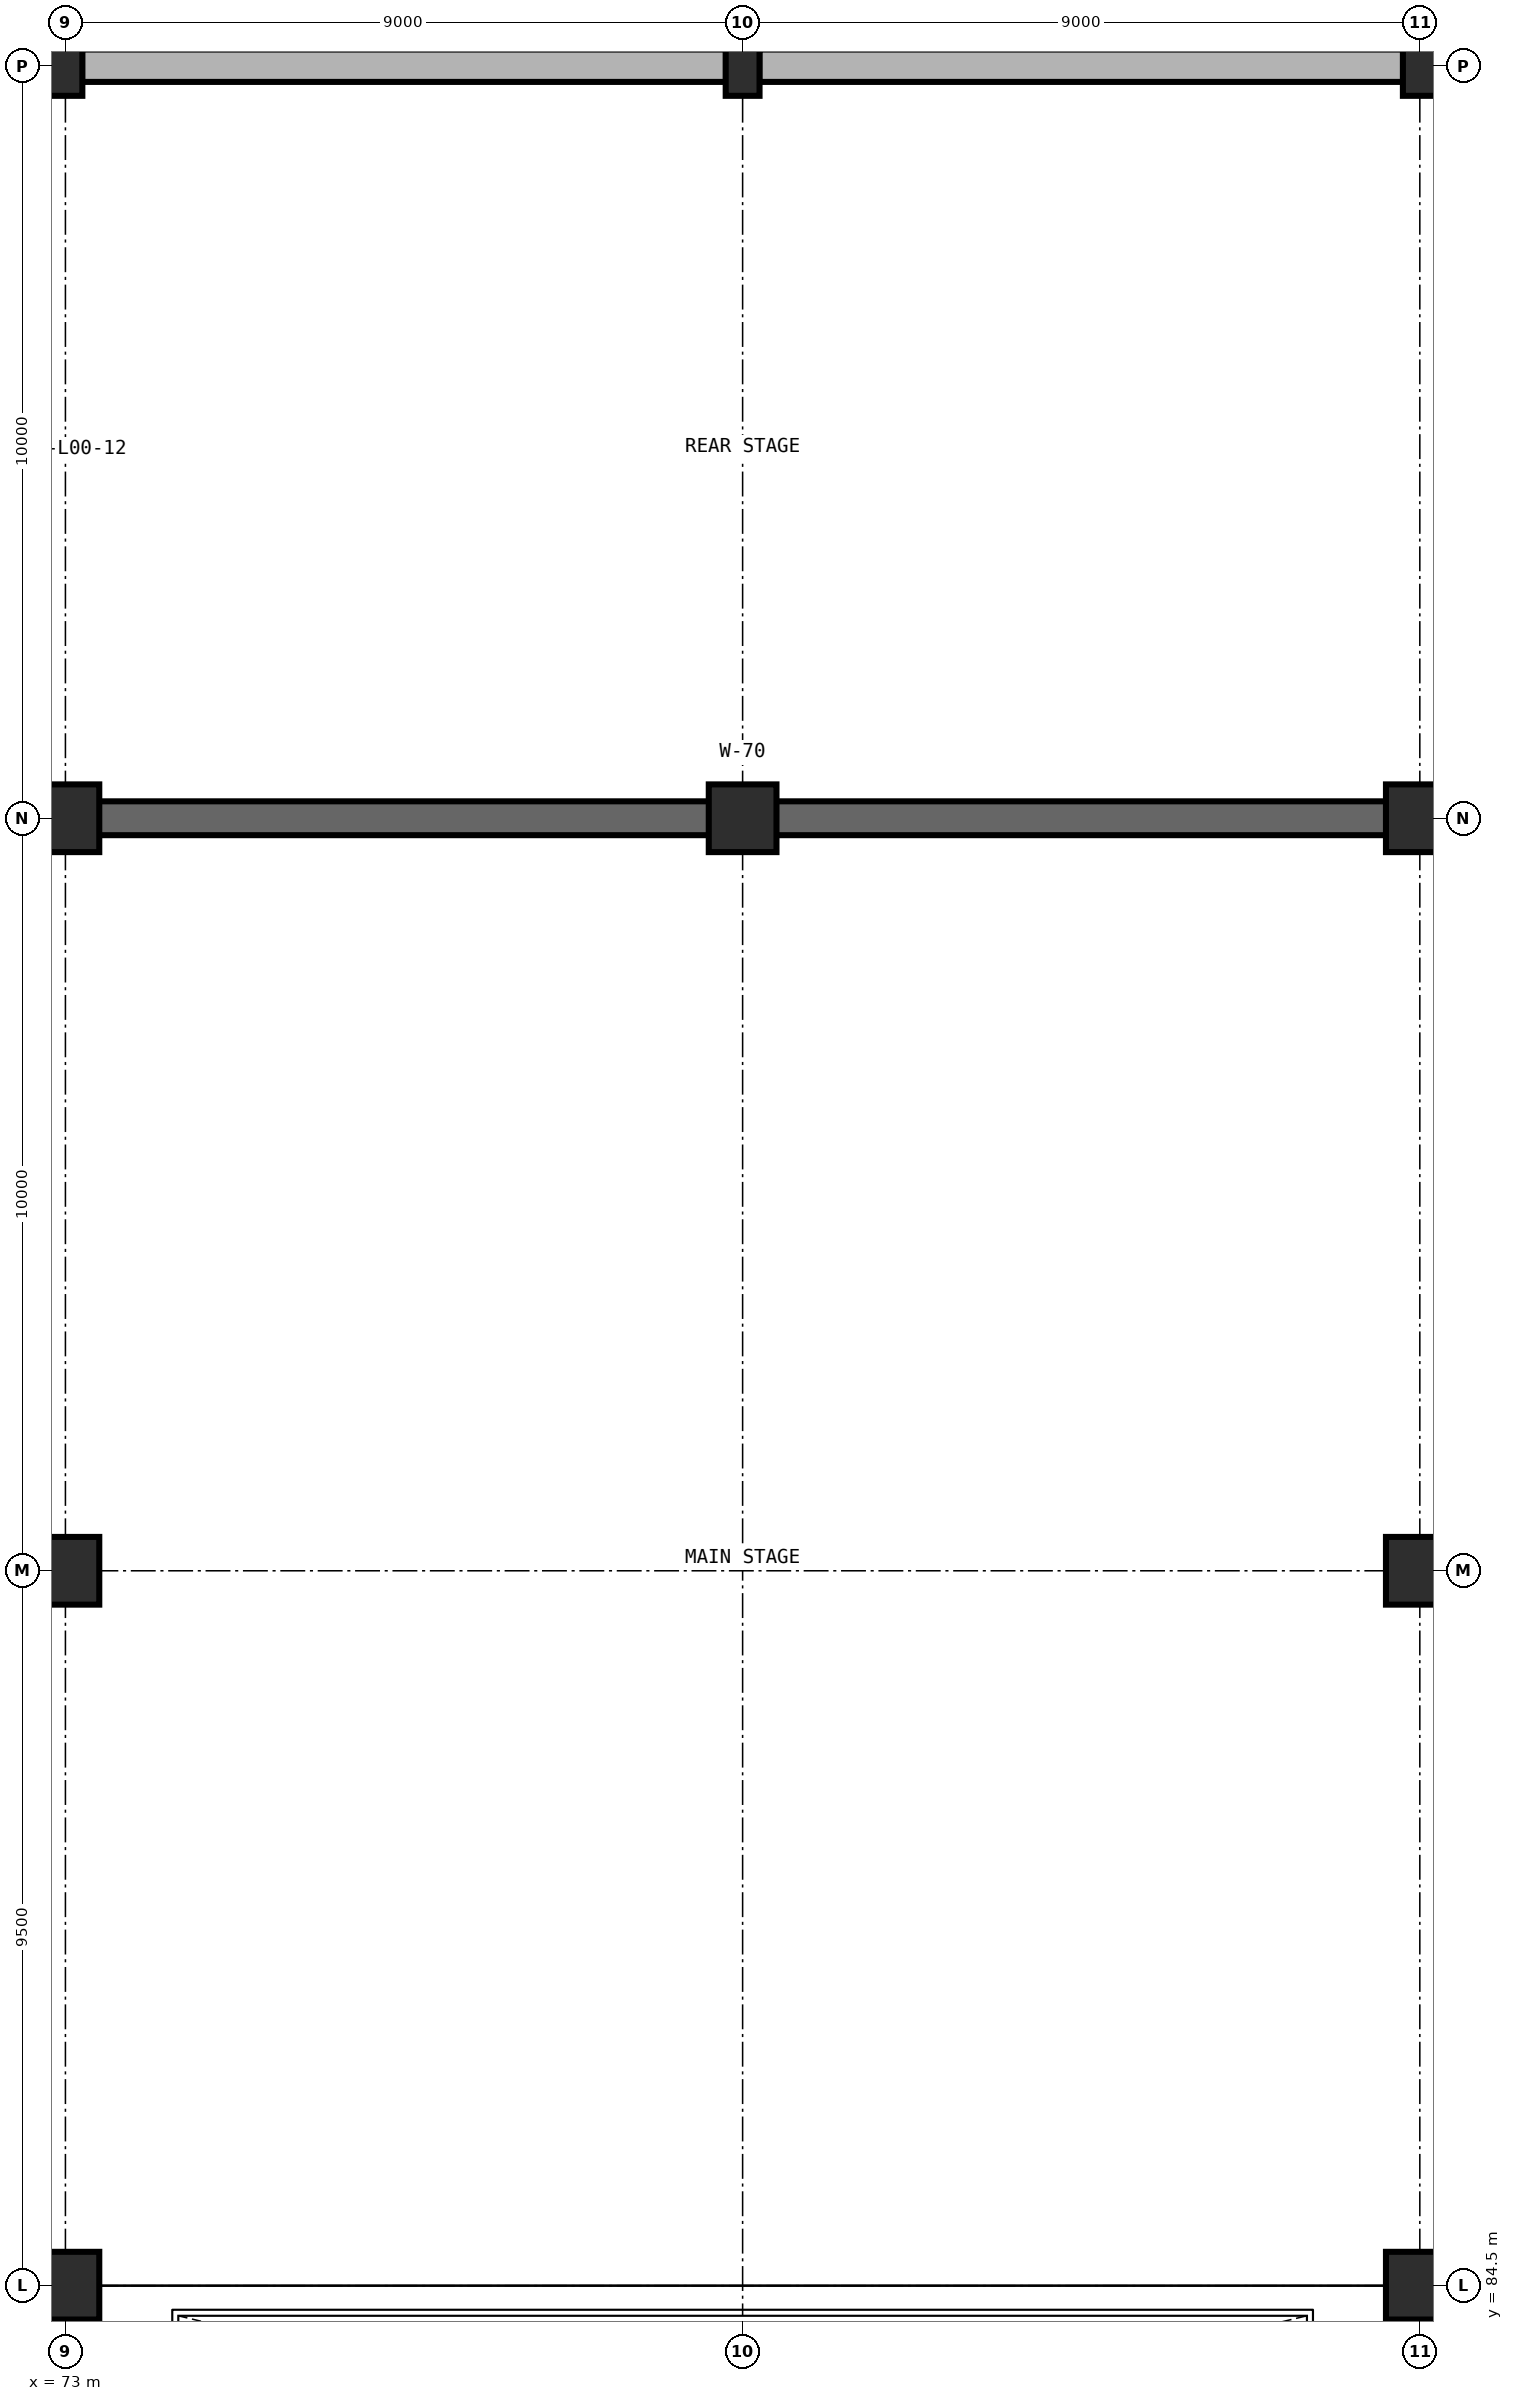
"""IFC4 building model, lengths in metres.
Left out: names, types, materials, properties, quantities, classifications, styles, units other than length and angle.
Written with IfcOpenShell. Run it as: python <this file> out.ifc"""

import sys

from ifc_helpers import new_model, si_unit, direction, frame, frame_2d, origin, origin_2d, place, context, subcontext, project, spatial, rectangle, extrude, element, save


model = new_model("IFC4")
c1 = context("Model", 3, precision=1e-05, world=origin(), true_north=direction((0.0, 1.0)))
c2 = subcontext(c1, "Body", "Model", "MODEL_VIEW")
j1 = project(units=[si_unit("LENGTHUNIT", "METRE"), si_unit("PLANEANGLEUNIT", "RADIAN")], contexts=[c1])
p1 = place(None, origin())
s1 = spatial("IfcSite", under=j1, at=p1, CompositionType="ELEMENT")
p2 = place(p1, origin())
s2 = spatial("IfcBuilding", under=s1, at=p2, CompositionType="ELEMENT")
p3 = place(p2, origin())
s3 = spatial("IfcBuildingStorey", under=s2, at=p3, CompositionType="ELEMENT", Elevation=0.0)
for number, where, z_axis, x_axis in (
    (1, (73.0, 84.5, 0.0), (0.0, 0.0, 1.0), (1.0, 0.0, 0.0)),
    (2, (73.0, 94.0, 0.0), (0.0, 0.0, 1.0), (1.0, 0.0, 0.0)),
    (3, (73.0, 104.0, 0.0), (0.0, 0.0, 1.0), (1.0, 0.0, 0.0)),
):
    element("IfcColumn", number, at=place(p3, frame(where, z_axis=z_axis, x_axis=x_axis)), inside=s3, PredefinedType="COLUMN", context=c2, shape_type="SweptSolid", body=[
        extrude(rectangle(XDim=0.9, YDim=0.9, at=origin_2d()), origin(), (0.0, 0.0, 1.0), 5.12),
    ])
p4 = place(p3, frame((73.0, 114.0, 0.0), z_axis=(0.0, 0.0, 1.0), x_axis=(1.0, 0.0, 0.0)))
e4 = element("IfcColumn", 4, at=p4, inside=s3, PredefinedType="PILASTER", context=c2, shape_type="SweptSolid", body=[
    extrude(rectangle(XDim=0.45, YDim=0.8, at=origin_2d()), origin(), (0.0, 0.0, 1.0), 5.12),
])
p5 = place(p3, frame((82.0, 104.0, 0.0), z_axis=(0.0, 0.0, 1.0), x_axis=(1.0, 0.0, 0.0)))
e5 = element("IfcColumn", 5, at=p5, inside=s3, PredefinedType="COLUMN", context=c2, shape_type="SweptSolid", body=[
    extrude(rectangle(XDim=0.9, YDim=0.9, at=origin_2d()), origin(), (0.0, 0.0, 1.0), 5.12),
])
p6 = place(p3, frame((82.0, 114.0, 0.0), z_axis=(0.0, 0.0, 1.0), x_axis=(1.0, 0.0, 0.0)))
e6 = element("IfcColumn", 6, at=p6, inside=s3, PredefinedType="PILASTER", context=c2, shape_type="SweptSolid", body=[
    extrude(rectangle(XDim=0.45, YDim=0.8, at=origin_2d()), origin(), (0.0, 0.0, 1.0), 5.12),
])
for number, where, z_axis, x_axis in (
    (7, (91.0, 84.5, 0.0), (0.0, 0.0, 1.0), (1.0, 0.0, 0.0)),
    (8, (91.0, 94.0, 0.0), (0.0, 0.0, 1.0), (1.0, 0.0, 0.0)),
    (9, (91.0, 104.0, 0.0), (0.0, 0.0, 1.0), (1.0, 0.0, 0.0)),
):
    element("IfcColumn", number, at=place(p3, frame(where, z_axis=z_axis, x_axis=x_axis)), inside=s3, PredefinedType="COLUMN", context=c2, shape_type="SweptSolid", body=[
        extrude(rectangle(XDim=0.9, YDim=0.9, at=origin_2d()), origin(), (0.0, 0.0, 1.0), 5.12),
    ])
p7 = place(p3, frame((91.0, 114.0, 0.0), z_axis=(0.0, 0.0, 1.0), x_axis=(1.0, 0.0, 0.0)))
e10 = element("IfcColumn", 10, at=p7, inside=s3, PredefinedType="PILASTER", context=c2, shape_type="SweptSolid", body=[
    extrude(rectangle(XDim=0.45, YDim=0.8, at=origin_2d()), origin(), (0.0, 0.0, 1.0), 5.12),
])
p8 = place(p3, frame((72.775, 104.0, 0.0), z_axis=(0.0, 0.0, 1.0), x_axis=(1.0, 0.0, 0.0)))
e11 = element("IfcWall", 11, at=p8, inside=s3, PredefinedType="SHEAR", context=c2, shape_type="SweptSolid", body=[
    extrude(rectangle(XDim=18.45, YDim=0.45, at=frame_2d((9.225, 0.0))), origin(), (0.0, 0.0, 1.0), 5.4),
])
for number, where, z_axis, x_axis in (
    (12, (73.221, 114.0, 0.0), (0.0, 0.0, 1.0), (1.0, 0.0, 0.0)),
    (13, (82.221, 114.0, 0.0), (0.0, 0.0, 1.0), (1.0, 0.0, 0.0)),
):
    element("IfcWall", number, at=place(p3, frame(where, z_axis=z_axis, x_axis=x_axis)), inside=s3, PredefinedType="SOLIDWALL", context=c2, shape_type="SweptSolid", body=[
        extrude(rectangle(XDim=8.558, YDim=0.43, at=frame_2d((4.279, 0.0))), origin(), (0.0, 0.0, 1.0), 4.731),
    ])
save(model, sys.argv[1])
